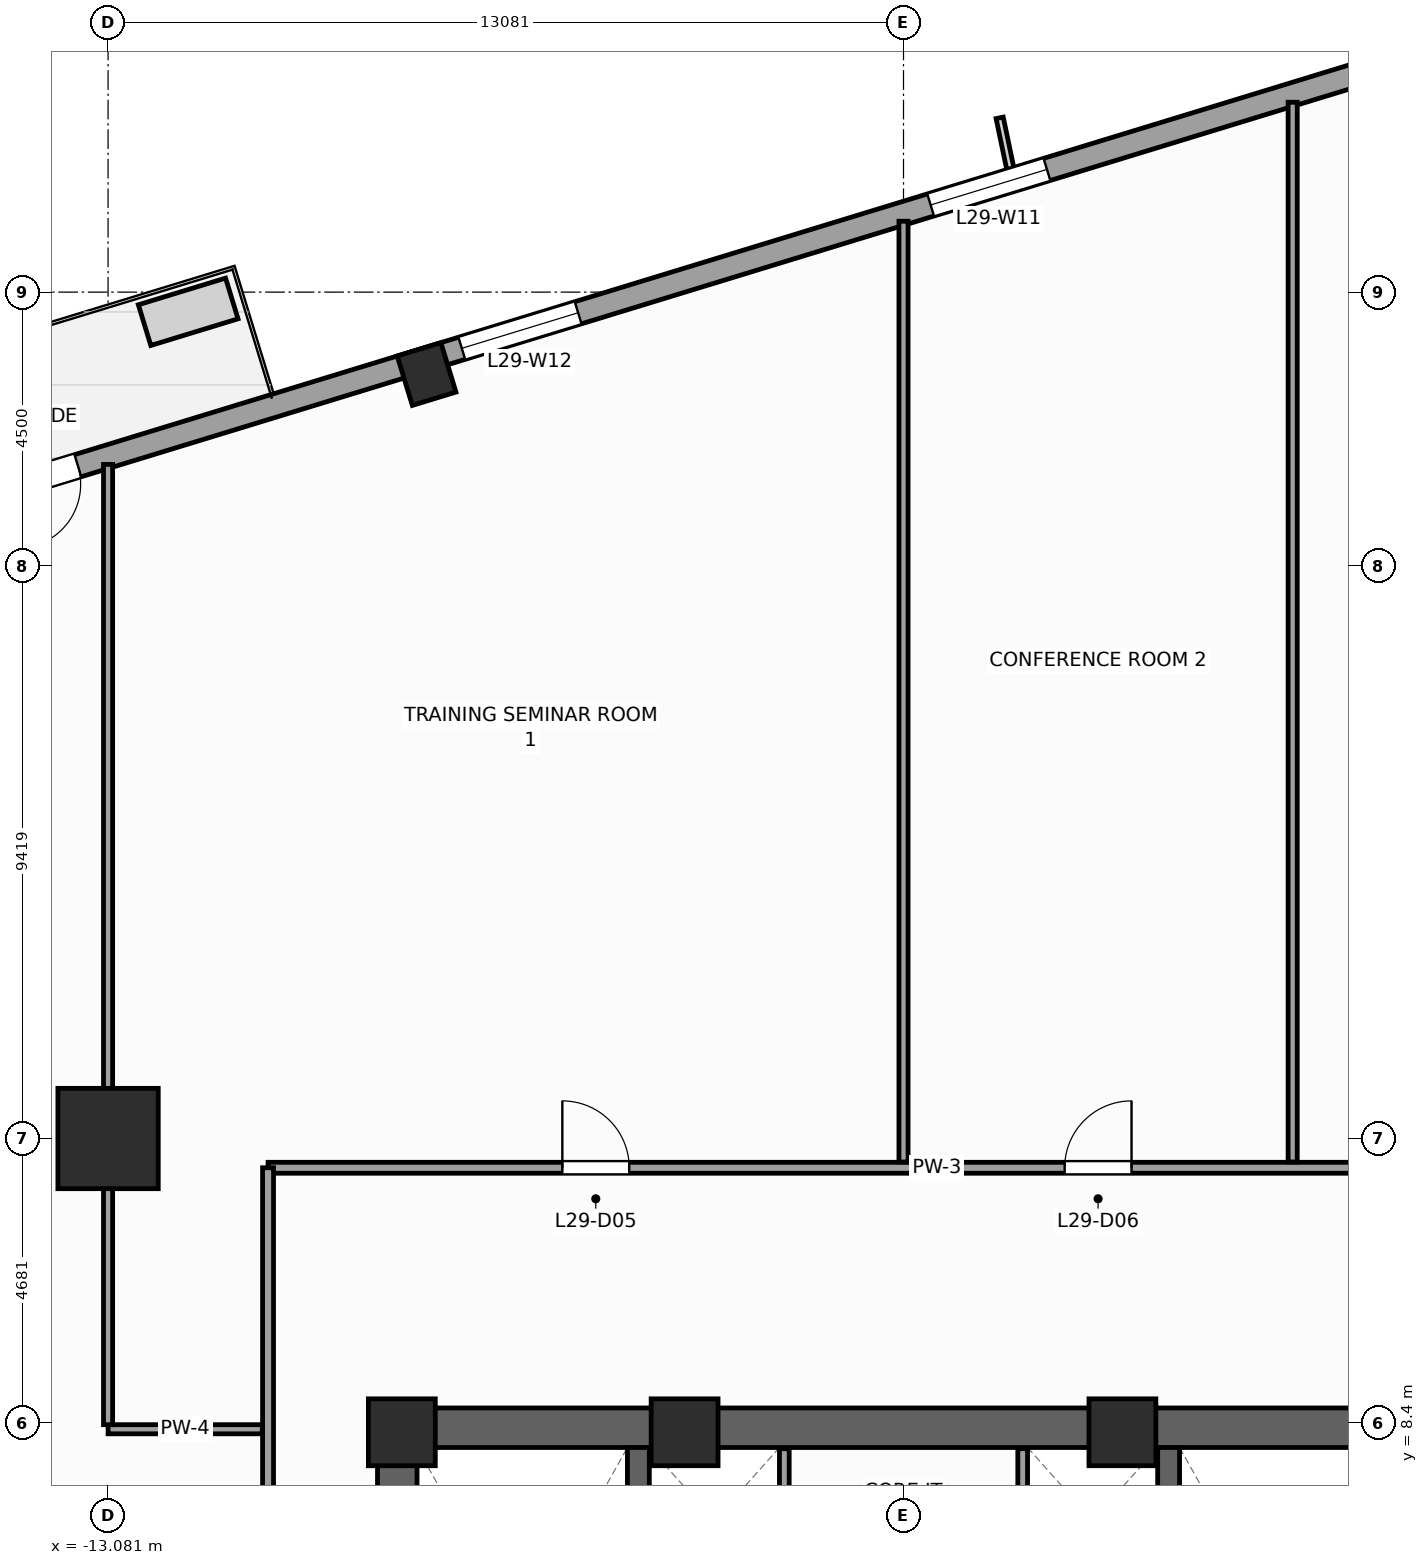
"""IFC4 building model, lengths in metres.
Left out: names, types, materials, properties, quantities, classifications, styles, units other than length and angle.
Written with IfcOpenShell. Run it as: python <this file> out.ifc"""

import sys

from ifc_helpers import new_model, si_unit, direction, frame, frame_2d, origin, origin_2d, place, context, subcontext, project, spatial, rectangle, extrude, source, transform, mapped, element, fill, save


model = new_model("IFC4")
c1 = context("Model", 3, precision=1e-05, world=origin(), true_north=direction((0.0, 1.0)))
c2 = subcontext(c1, "Body", "Model", "MODEL_VIEW")
j1 = project(units=[si_unit("LENGTHUNIT", "METRE"), si_unit("PLANEANGLEUNIT", "RADIAN")], contexts=[c1])
p1 = place(None, origin())
s1 = spatial("IfcSite", under=j1, at=p1, CompositionType="ELEMENT")
p2 = place(p1, origin())
s2 = spatial("IfcBuilding", under=s1, at=p2, CompositionType="ELEMENT")
p3 = place(p2, frame((0.0, 0.0, 123.2)))
s3 = spatial("IfcBuildingStorey", under=s2, at=p3, CompositionType="ELEMENT", Elevation=123.2)
p4 = place(p3, frame((-8.65, 8.325, 0.0), z_axis=(0.0, 0.0, 1.0), x_axis=(1.0, 0.0, 0.0)))
e1 = element("IfcWall", 1, at=p4, inside=s3, PredefinedType="SHEAR", context=c2, shape_type="SweptSolid", body=[
    extrude(rectangle(XDim=17.3, YDim=0.65, at=frame_2d((8.65, 0.0))), origin(), (0.0, 0.0, 1.0), 4.0),
])
p5 = place(p3, frame((-8.325, -8.0, 0.0), z_axis=(0.0, 0.0, 1.0), x_axis=(0.0, 1.0, 0.0)))
e2 = element("IfcWall", 2, at=p5, inside=s3, PredefinedType="SHEAR", context=c2, shape_type="SweptSolid", body=[
    extrude(rectangle(XDim=16.0, YDim=0.65, at=frame_2d((8.0, 0.0))), origin(), (0.0, 0.0, 1.0), 4.0),
])
p6 = place(p5, frame((4.69, 0.0, 0.0)))
e3 = element("IfcOpeningElement", 3, at=p6, cuts=e2, PredefinedType="OPENING", context=c2, shape_type="SweptSolid", body=[
    extrude(rectangle(XDim=1.3, YDim=2.2, at=frame_2d((0.65, 1.1))), frame((0.0, 0.335, 0.0), z_axis=(0.0, -1.0, 0.0), x_axis=(1.0, 0.0, 0.0)), (0.0, 0.0, 1.0), 0.67),
])
for number, where, z_axis, x_axis in (
    (4, (-4.36, -8.0, 0.0), (0.0, 0.0, 1.0), (0.0, 1.0, 0.0)),
    (5, (4.36, -8.0, 0.0), (0.0, 0.0, 1.0), (0.0, 1.0, 0.0)),
):
    element("IfcWall", number, at=place(p3, frame(where, z_axis=z_axis, x_axis=x_axis)), inside=s3, PredefinedType="SHEAR", context=c2, shape_type="SweptSolid", body=[
        extrude(rectangle(XDim=16.0, YDim=0.36, at=frame_2d((8.0, 0.0))), origin(), (0.0, 0.0, 1.0), 4.0),
    ])
m1 = source(origin(), c2, "Body", "SweptSolid", [
    extrude(rectangle(XDim=1.1, YDim=1.1, at=origin_2d()), origin(), (0.0, 0.0, 1.0), 4.0),
])
for number, where, z_axis, x_axis in (
    (6, (-8.25, 8.25, 0.0), (0.0, 0.0, 1.0), (1.0, 0.0, 0.0)),
    (7, (-3.6, 8.25, 0.0), (0.0, 0.0, 1.0), (1.0, 0.0, 0.0)),
    (8, (3.6, 8.25, 0.0), (0.0, 0.0, 1.0), (1.0, 0.0, 0.0)),
):
    element("IfcColumn", number, at=place(p3, frame(where, z_axis=z_axis, x_axis=x_axis)), inside=s3, PredefinedType="PILASTER", context=c2, shape_type="MappedRepresentation", body=[
        mapped(m1, transform((0.0, 0.0, 0.0), scale=1.0)),
    ])
m2 = source(origin(), c2, "Body", "SweptSolid", [
    extrude(rectangle(XDim=1.65, YDim=1.65, at=origin_2d()), origin(), (0.0, 0.0, 1.0), 4.0),
])
p7 = place(p3, frame((-13.081, 13.081, 0.0), z_axis=(0.0, 0.0, 1.0), x_axis=(1.0, 0.0, 0.0)))
e9 = element("IfcColumn", 9, at=p7, inside=s3, PredefinedType="COLUMN", context=c2, shape_type="MappedRepresentation", body=[
    mapped(m2, transform((0.0, 0.0, 0.0), scale=1.0)),
])
m3 = source(origin(), c2, "Body", "SweptSolid", [
    extrude(rectangle(XDim=0.75, YDim=0.85, at=origin_2d()), origin(), (0.0, 0.0, 1.0), 4.0),
])
p8 = place(p3, frame((-7.843, 25.653, 0.0), z_axis=(0.0, 0.0, 1.0), x_axis=(0.956304755963, 0.292371704723, 0.0)))
e10 = element("IfcColumn", 10, at=p8, inside=s3, PredefinedType="COLUMN", context=c2, shape_type="MappedRepresentation", body=[
    mapped(m3, transform((0.0, 0.0, 0.0), scale=1.0)),
])
p9 = place(p3, frame((14.265, 32.658, 0.0), z_axis=(0.0, 0.0, 1.0), x_axis=(-0.956304320851, -0.292373127906, 0.0)))
e11 = element("IfcWall", 11, at=p9, inside=s3, PredefinedType="STANDARD", context=c2, shape_type="SweptSolid", body=[
    extrude(rectangle(XDim=46.38, YDim=0.38, at=frame_2d((23.19, 0.0))), origin(), (0.0, 0.0, 1.0), 3.14),
])
p10 = place(p9, frame((29.115, 0.0, 0.0)))
e12 = element("IfcOpeningElement", 12, at=p10, cuts=e11, PredefinedType="OPENING", context=c2, shape_type="SweptSolid", body=[
    extrude(rectangle(XDim=1.05, YDim=2.25, at=frame_2d((0.525, 1.125))), frame((0.0, 0.2, 0.0), z_axis=(0.0, -1.0, 0.0), x_axis=(1.0, 0.0, 0.0)), (0.0, 0.0, 1.0), 0.4),
])
p11 = place(p9, frame((4.865, 0.0, 0.51)))
e13 = element("IfcOpeningElement", 13, at=p11, cuts=e11, PredefinedType="OPENING", context=c2, shape_type="SweptSolid", body=[
    extrude(rectangle(XDim=1.4, YDim=2.4, at=frame_2d((0.7, 1.2))), frame((0.0, 0.2, 0.0), z_axis=(0.0, -1.0, 0.0), x_axis=(1.0, 0.0, 0.0)), (0.0, 0.0, 1.0), 0.4),
])
p12 = place(p9, frame((12.45, 0.0, 0.51)))
e14 = element("IfcOpeningElement", 14, at=p12, cuts=e11, PredefinedType="OPENING", context=c2, shape_type="SweptSolid", body=[
    extrude(rectangle(XDim=2.0, YDim=2.4, at=frame_2d((1.0, 1.2))), frame((0.0, 0.2, 0.0), z_axis=(0.0, -1.0, 0.0), x_axis=(1.0, 0.0, 0.0)), (0.0, 0.0, 1.0), 0.4),
])
p13 = place(p9, frame((20.512, 0.0, 0.51)))
e15 = element("IfcOpeningElement", 15, at=p13, cuts=e11, PredefinedType="OPENING", context=c2, shape_type="SweptSolid", body=[
    extrude(rectangle(XDim=2.0, YDim=2.4, at=frame_2d((1.0, 1.2))), frame((0.0, 0.2, 0.0), z_axis=(0.0, -1.0, 0.0), x_axis=(1.0, 0.0, 0.0)), (0.0, 0.0, 1.0), 0.4),
])
p14 = place(p9, frame((31.288, 0.0, 0.51)))
e16 = element("IfcOpeningElement", 16, at=p14, cuts=e11, PredefinedType="OPENING", context=c2, shape_type="SweptSolid", body=[
    extrude(rectangle(XDim=2.0, YDim=2.4, at=frame_2d((1.0, 1.2))), frame((0.0, 0.2, 0.0), z_axis=(0.0, -1.0, 0.0), x_axis=(1.0, 0.0, 0.0)), (0.0, 0.0, 1.0), 0.4),
])
p15 = place(p9, frame((39.187, 0.0, 0.51)))
e17 = element("IfcOpeningElement", 17, at=p15, cuts=e11, PredefinedType="OPENING", context=c2, shape_type="SweptSolid", body=[
    extrude(rectangle(XDim=1.4, YDim=2.4, at=frame_2d((0.7, 1.2))), frame((0.0, 0.2, 0.0), z_axis=(0.0, -1.0, 0.0), x_axis=(1.0, 0.0, 0.0)), (0.0, 0.0, 1.0), 0.4),
])
for number, where, z_axis, x_axis in (
    (18, (-1.96, 4.58, 0.0), (0.0, 0.0, 1.0), (0.0, 1.0, 0.0)),
    (19, (1.96, 4.58, 0.0), (0.0, 0.0, 1.0), (0.0, 1.0, 0.0)),
):
    element("IfcWall", number, at=place(p3, frame(where, z_axis=z_axis, x_axis=x_axis)), inside=s3, PredefinedType="PARTITIONING", context=c2, shape_type="SweptSolid", body=[
        extrude(rectangle(XDim=3.4, YDim=0.16, at=frame_2d((1.7, 0.0))), origin(), (0.0, 0.0, 1.0), 3.74),
    ])
p16 = place(p3, frame((-10.45, 12.6, 0.0), z_axis=(0.0, 0.0, 1.0), x_axis=(1.0, 0.0, 0.0)))
e20 = element("IfcWall", 20, at=p16, inside=s3, PredefinedType="PARTITIONING", context=c2, shape_type="SweptSolid", body=[
    extrude(rectangle(XDim=22.0, YDim=0.18, at=frame_2d((11.0, 0.0))), origin(), (0.0, 0.0, 1.0), 3.74),
])
p17 = place(p16, frame((4.839, 0.0, 0.0)))
e21 = element("IfcOpeningElement", 21, at=p17, cuts=e20, PredefinedType="OPENING", context=c2, shape_type="SweptSolid", body=[
    extrude(rectangle(XDim=1.1, YDim=2.2, at=frame_2d((0.55, 1.1))), frame((0.0, 0.1, 0.0), z_axis=(0.0, -1.0, 0.0), x_axis=(1.0, 0.0, 0.0)), (0.0, 0.0, 1.0), 0.2),
])
p18 = place(p16, frame((13.1, 0.0, 0.0)))
e22 = element("IfcOpeningElement", 22, at=p18, cuts=e20, PredefinedType="OPENING", context=c2, shape_type="SweptSolid", body=[
    extrude(rectangle(XDim=1.1, YDim=2.2, at=frame_2d((0.55, 1.1))), frame((0.0, 0.1, 0.0), z_axis=(0.0, -1.0, 0.0), x_axis=(1.0, 0.0, 0.0)), (0.0, 0.0, 1.0), 0.2),
])
p19 = place(p16, frame((18.71, 0.0, 0.0)))
e23 = element("IfcOpeningElement", 23, at=p19, cuts=e20, PredefinedType="OPENING", context=c2, shape_type="SweptSolid", body=[
    extrude(rectangle(XDim=1.1, YDim=2.2, at=frame_2d((0.55, 1.1))), frame((0.0, 0.1, 0.0), z_axis=(0.0, -1.0, 0.0), x_axis=(1.0, 0.0, 0.0)), (0.0, 0.0, 1.0), 0.2),
])
p20 = place(p3, frame((-10.45, -1.05, 0.0), z_axis=(0.0, 0.0, 1.0), x_axis=(0.0, 1.0, 0.0)))
e24 = element("IfcWall", 24, at=p20, inside=s3, PredefinedType="PARTITIONING", context=c2, shape_type="SweptSolid", body=[
    extrude(rectangle(XDim=13.65, YDim=0.18, at=frame_2d((6.825, 0.0))), origin(), (0.0, 0.0, 1.0), 3.74),
])
p21 = place(p20, frame((1.455, 0.0, 0.0)))
e25 = element("IfcOpeningElement", 25, at=p21, cuts=e24, PredefinedType="OPENING", context=c2, shape_type="SweptSolid", body=[
    extrude(rectangle(XDim=0.95, YDim=2.1, at=frame_2d((0.475, 1.05))), frame((0.0, 0.1, 0.0), z_axis=(0.0, -1.0, 0.0), x_axis=(1.0, 0.0, 0.0)), (0.0, 0.0, 1.0), 0.2),
])
p22 = place(p20, frame((6.462, 0.0, 0.0)))
e26 = element("IfcOpeningElement", 26, at=p22, cuts=e24, PredefinedType="OPENING", context=c2, shape_type="SweptSolid", body=[
    extrude(rectangle(XDim=1.1, YDim=2.2, at=frame_2d((0.55, 1.1))), frame((0.0, 0.1, 0.0), z_axis=(0.0, -1.0, 0.0), x_axis=(1.0, 0.0, 0.0)), (0.0, 0.0, 1.0), 0.2),
])
p23 = place(p3, frame((-10.545, 8.3, 0.0), z_axis=(0.0, 0.0, 1.0), x_axis=(-1.0, 0.0, 0.0)))
e27 = element("IfcWall", 27, at=p23, inside=s3, PredefinedType="PARTITIONING", context=c2, shape_type="SweptSolid", body=[
    extrude(rectangle(XDim=2.536, YDim=0.15, at=frame_2d((1.268, 0.0))), origin(), (0.0, 0.0, 1.0), 3.74),
])
p24 = place(p3, frame((-13.081, 8.375, 0.0), z_axis=(0.0, 0.0, 1.0), x_axis=(0.0, 1.0, 0.0)))
e28 = element("IfcWall", 28, at=p24, inside=s3, PredefinedType="PARTITIONING", context=c2, shape_type="SweptSolid", body=[
    extrude(rectangle(XDim=15.792, YDim=0.15, at=frame_2d((7.896, 0.0))), origin(), (0.0, 0.0, 1.0), 2.732),
])
p25 = place(p3, frame((0.0, 12.695, 0.0), z_axis=(0.0, 0.0, 1.0), x_axis=(0.0, 1.0, 0.0)))
e29 = element("IfcWall", 29, at=p25, inside=s3, PredefinedType="PARTITIONING", context=c2, shape_type="SweptSolid", body=[
    extrude(rectangle(XDim=15.471, YDim=0.15, at=frame_2d((7.735, 0.0))), origin(), (0.0, 0.0, 1.0), 3.41),
])
p26 = place(p3, frame((6.4, 12.695, 0.0), z_axis=(0.0, 0.0, 1.0), x_axis=(0.0, 1.0, 0.0)))
e30 = element("IfcWall", 30, at=p26, inside=s3, PredefinedType="PARTITIONING", context=c2, shape_type="SweptSolid", body=[
    extrude(rectangle(XDim=17.427, YDim=0.15, at=frame_2d((8.714, 0.0))), origin(), (0.0, 0.0, 1.0), 3.74),
])
m4 = source(origin(), c2, "Body", "SweptSolid", [
    extrude(rectangle(XDim=1.05, YDim=2.25, at=frame_2d((0.525, 1.125))), frame((0.0, 0.025, 0.0), z_axis=(0.0, -1.0, 0.0), x_axis=(1.0, 0.0, 0.0)), (0.0, 0.0, 1.0), 0.05),
])
p27 = place(p10, origin())
e31 = element("IfcDoor", 31, at=p27, inside=s3, OperationType="SINGLE_SWING_RIGHT", PredefinedType="DOOR", context=c2, shape_type="MappedRepresentation", body=[
    mapped(m4, transform((0.0, 0.0, 0.0), scale=1.0)),
])
fill(e12, e31)
m5 = source(origin(), c2, "Body", "SweptSolid", [
    extrude(rectangle(XDim=2.0, YDim=2.4, at=frame_2d((1.0, 1.2))), frame((0.0, 0.03, 0.0), z_axis=(0.0, -1.0, 0.0), x_axis=(1.0, 0.0, 0.0)), (0.0, 0.0, 1.0), 0.06),
])
p28 = place(p12, origin())
e32 = element("IfcWindow", 32, at=p28, inside=s3, PartitioningType="SINGLE_PANEL", PredefinedType="WINDOW", context=c2, shape_type="MappedRepresentation", body=[
    mapped(m5, transform((0.0, 0.0, 0.0), scale=1.0)),
])
fill(e14, e32)
p29 = place(p13, origin())
e33 = element("IfcWindow", 33, at=p29, inside=s3, PartitioningType="SINGLE_PANEL", PredefinedType="WINDOW", context=c2, shape_type="MappedRepresentation", body=[
    mapped(m5, transform((0.0, 0.0, 0.0), scale=1.0)),
])
fill(e15, e33)
m6 = source(origin(), c2, "Body", "SweptSolid", [
    extrude(rectangle(XDim=1.1, YDim=2.2, at=frame_2d((0.55, 1.1))), frame((0.0, 0.025, 0.0), z_axis=(0.0, -1.0, 0.0), x_axis=(1.0, 0.0, 0.0)), (0.0, 0.0, 1.0), 0.05),
])
p30 = place(p17, origin())
e34 = element("IfcDoor", 34, at=p30, inside=s3, OperationType="SINGLE_SWING_LEFT", PredefinedType="DOOR", context=c2, shape_type="MappedRepresentation", body=[
    mapped(m6, transform((0.0, 0.0, 0.0), scale=1.0)),
])
fill(e21, e34)
p31 = place(p18, origin())
e35 = element("IfcDoor", 35, at=p31, inside=s3, OperationType="SINGLE_SWING_RIGHT", PredefinedType="DOOR", context=c2, shape_type="MappedRepresentation", body=[
    mapped(m6, transform((0.0, 0.0, 0.0), scale=1.0)),
])
fill(e22, e35)
save(model, sys.argv[1])
